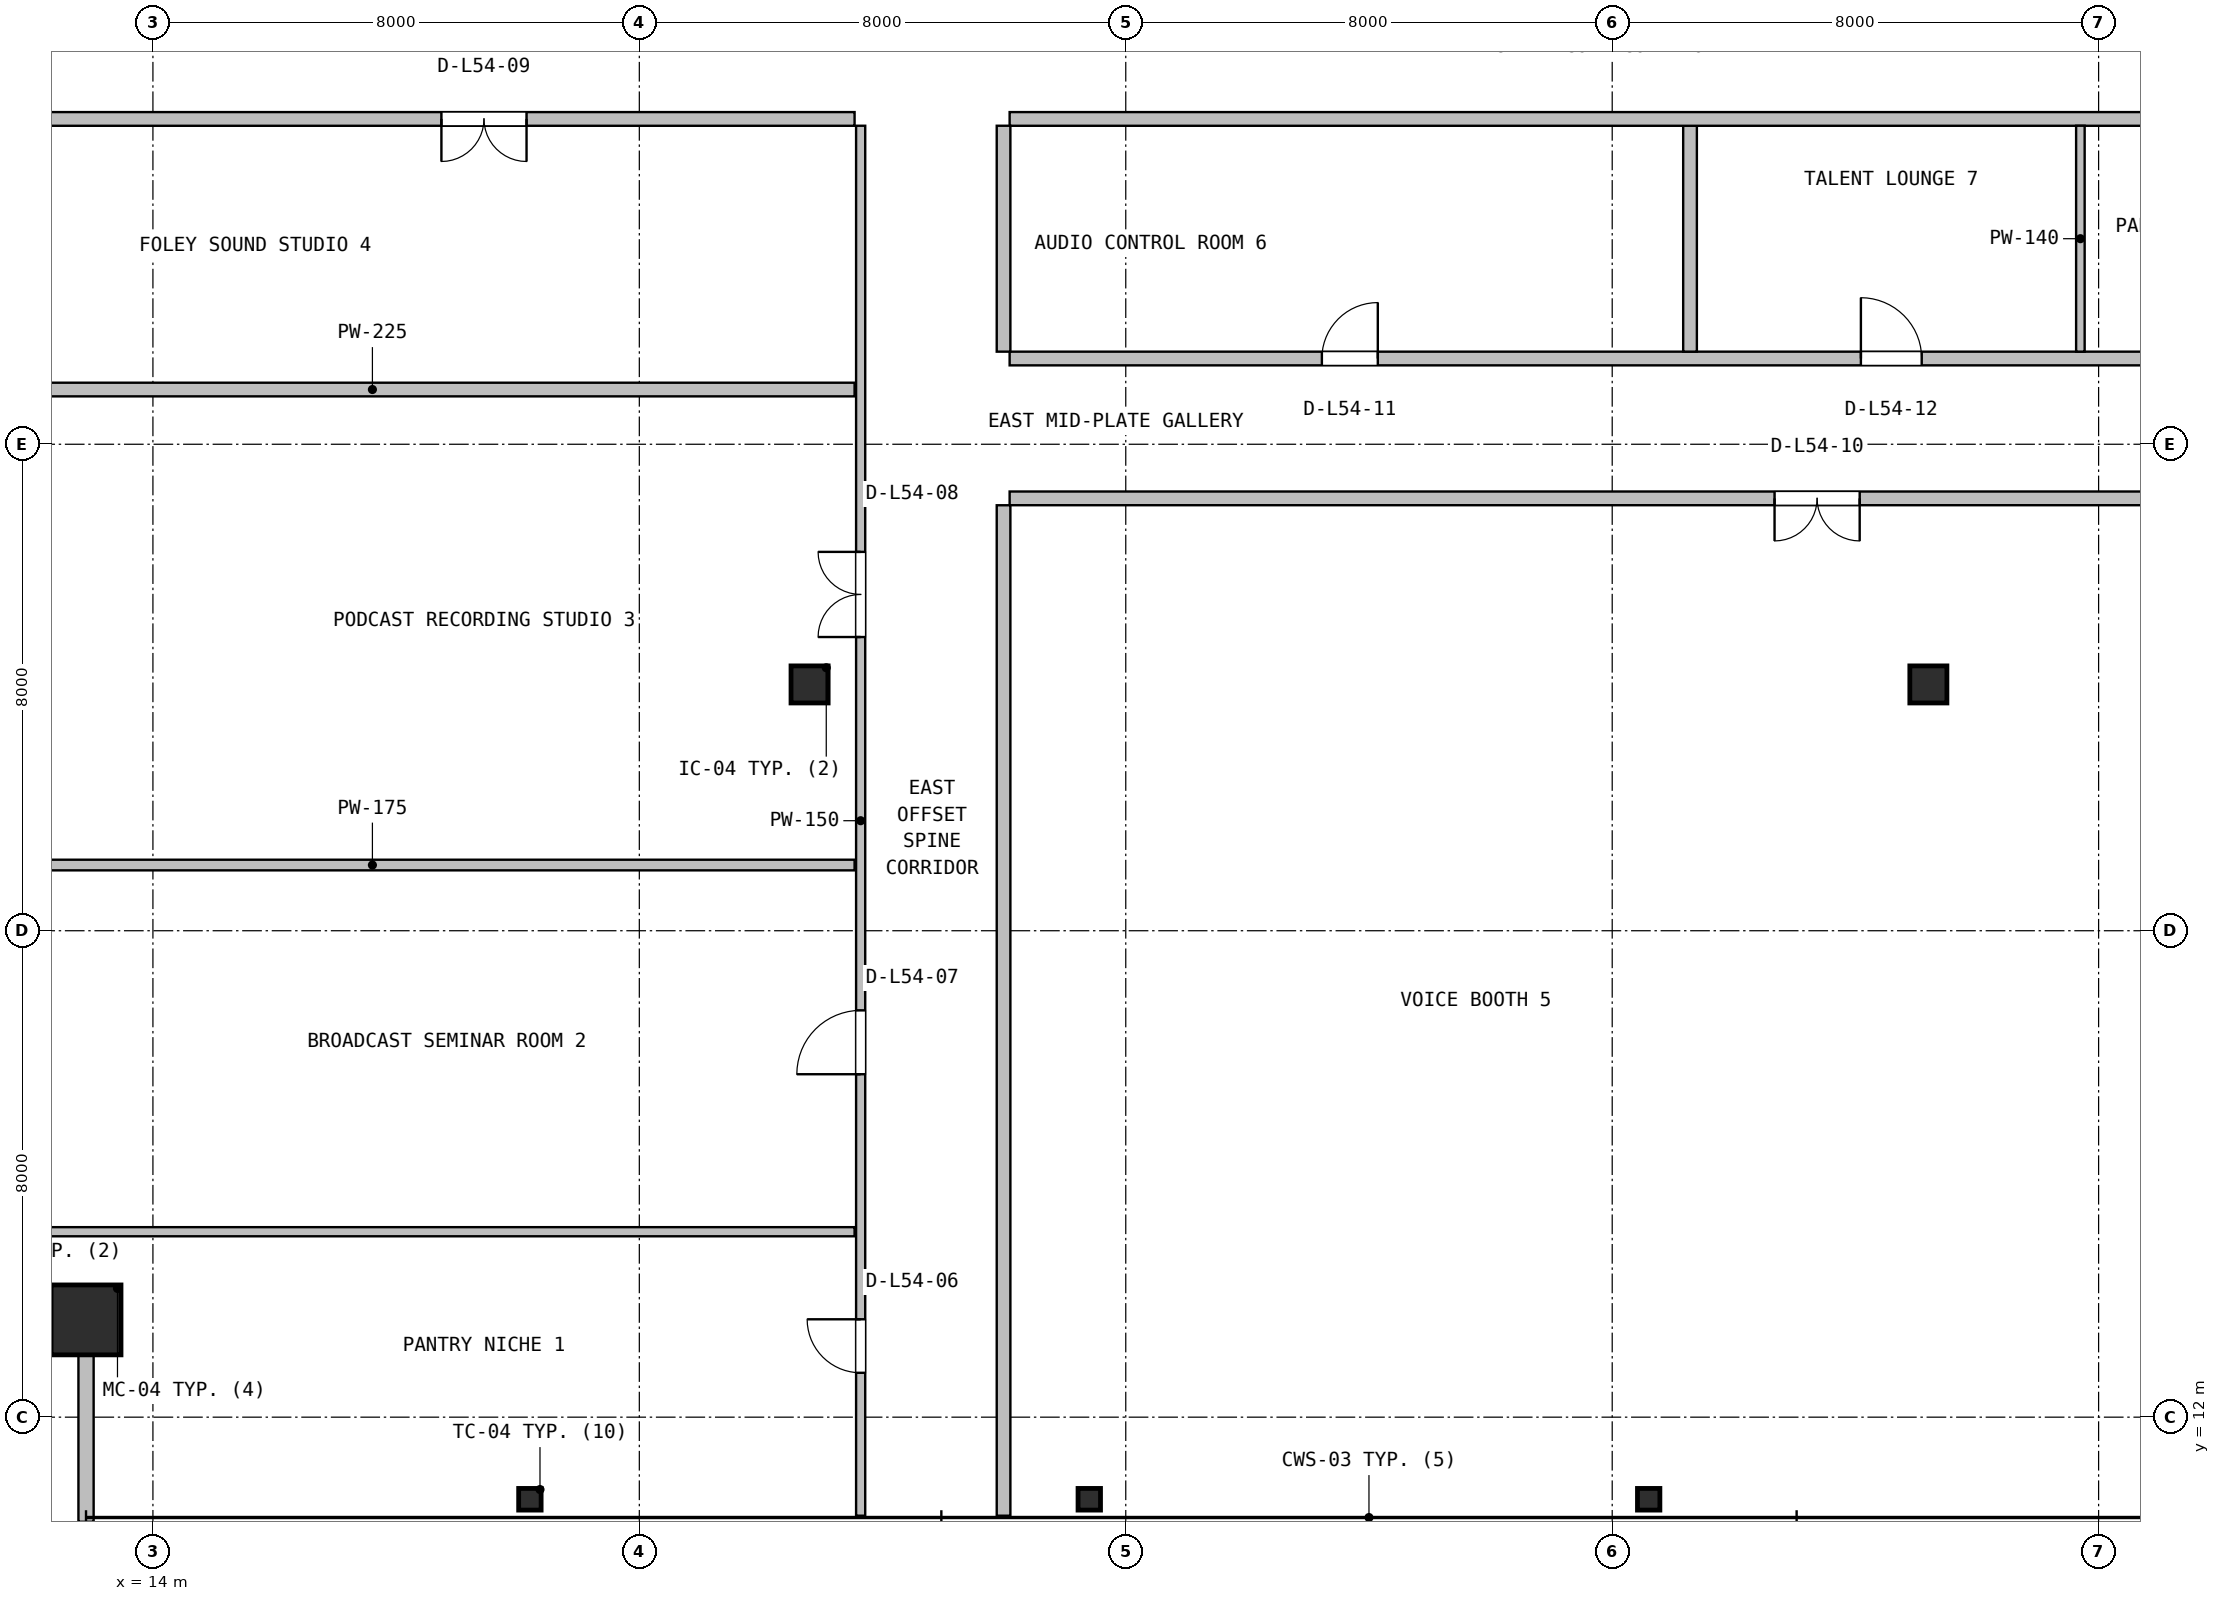
"""IFC4 building model, lengths in metres.
Left out: names, types, materials, properties, quantities, classifications, styles, units other than length and angle.
Written with IfcOpenShell. Run it as: python <this file> out.ifc"""

import sys

from ifc_helpers import new_model, si_unit, direction, frame, frame_2d, origin, origin_2d, place, context, subcontext, project, spatial, rectangle, hollow_rectangle, hollow_circle, i_section, extrude, source, transform, mapped, element, fill, save


model = new_model("IFC4")
c1 = context("Model", 3, precision=1e-05, world=origin(), true_north=direction((0.0, 1.0)))
c2 = subcontext(c1, "Body", "Model", "MODEL_VIEW")
j1 = project(units=[si_unit("LENGTHUNIT", "METRE"), si_unit("PLANEANGLEUNIT", "RADIAN")], contexts=[c1])
p1 = place(None, origin())
s1 = spatial("IfcSite", under=j1, at=p1, CompositionType="ELEMENT")
p2 = place(p1, origin())
s2 = spatial("IfcBuilding", under=s1, at=p2, CompositionType="ELEMENT")
p3 = place(p2, frame((0.0, 0.0, 218.8)))
s3 = spatial("IfcBuildingStorey", under=s2, at=p3, CompositionType="ELEMENT", Elevation=218.8)
m1 = source(origin(), c2, "Body", "SweptSolid", [
    extrude(hollow_rectangle(XDim=1.15, YDim=1.15, WallThickness=0.045, at=origin_2d()), origin(), (0.0, 0.0, 1.0), 3.8),
])
p4 = place(p3, frame((12.9, 13.6, 0.0), z_axis=(0.0, 0.0, 1.0), x_axis=(1.0, 0.0, 0.0)))
e1 = element("IfcColumn", 1, at=p4, inside=s3, PredefinedType="COLUMN", context=c2, shape_type="MappedRepresentation", body=[
    mapped(m1, transform((0.0, 0.0, 0.0), x_axis=(1.0, 0.0, 0.0), y_axis=(0.0, 1.0, 0.0), z_axis=(0.0, 0.0, 1.0), scale=1.0)),
])
m2 = source(origin(), c2, "Body", "SweptSolid", [
    extrude(i_section(OverallWidth=0.369, OverallDepth=0.356, WebThickness=0.011, FlangeThickness=0.018, FilletRadius=0.016, at=origin_2d()), origin(), (0.0, 0.0, 1.0), 3.8),
])
for number, where, z_axis, x_axis in (
    (2, (20.2, 10.65, 0.0), (0.0, 0.0, 1.0), (1.0, 0.0, 0.0)),
    (3, (29.4, 10.65, 0.0), (0.0, 0.0, 1.0), (1.0, 0.0, 0.0)),
    (4, (38.6, 10.65, 0.0), (0.0, 0.0, 1.0), (1.0, 0.0, 0.0)),
):
    element("IfcColumn", number, at=place(p3, frame(where, z_axis=z_axis, x_axis=x_axis)), inside=s3, PredefinedType="COLUMN", context=c2, shape_type="MappedRepresentation", body=[
        mapped(m2, transform((0.0, 0.0, 0.0), x_axis=(1.0, 0.0, 0.0), y_axis=(0.0, 1.0, 0.0), z_axis=(0.0, 0.0, 1.0), scale=1.0)),
    ])
m3 = source(origin(), c2, "Body", "SweptSolid", [
    extrude(hollow_circle(Radius=0.305, WallThickness=0.025, at=origin_2d()), origin(), (0.0, 0.0, 1.0), 3.8),
])
for number, where, z_axis, x_axis in (
    (5, (24.8, 24.05, 0.0), (0.0, 0.0, 1.0), (1.0, 0.0, 0.0)),
    (6, (43.2, 24.05, 0.0), (0.0, 0.0, 1.0), (1.0, 0.0, 0.0)),
):
    element("IfcColumn", number, at=place(p3, frame(where, z_axis=z_axis, x_axis=x_axis)), inside=s3, PredefinedType="COLUMN", context=c2, shape_type="MappedRepresentation", body=[
        mapped(m3, transform((0.0, 0.0, 0.0), x_axis=(1.0, 0.0, 0.0), y_axis=(0.0, 1.0, 0.0), z_axis=(0.0, 0.0, 1.0), scale=1.0)),
    ])
p5 = place(p3, frame((12.9, 10.28, 0.0), z_axis=(0.0, 0.0, 1.0), x_axis=(0.0, 1.0, 0.0)))
e7 = element("IfcWall", 7, at=p5, inside=s3, PredefinedType="SOLIDWALL", context=c2, shape_type="SweptSolid", body=[
    extrude(rectangle(XDim=3.4, YDim=0.25, at=frame_2d((1.7, 0.0))), origin(), (0.0, 0.0, 1.0), 3.171),
])
p6 = place(p3, frame((25.64, 10.38, 0.0), z_axis=(0.0, 0.0, 1.0), x_axis=(0.0, 1.0, 0.0)))
e8 = element("IfcWall", 8, at=p6, inside=s3, PredefinedType="PARTITIONING", context=c2, shape_type="SweptSolid", body=[
    extrude(rectangle(XDim=22.858, YDim=0.15, at=frame_2d((11.429, 0.0))), origin(), (0.0, 0.0, 1.0), 2.908),
])
p7 = place(p6, frame((2.35, 0.0, 0.0)))
e9 = element("IfcOpeningElement", 9, at=p7, cuts=e8, PredefinedType="OPENING", context=c2, shape_type="SweptSolid", body=[
    extrude(rectangle(XDim=0.88, YDim=2.06, at=frame_2d((0.44, 1.03))), frame((0.0, 0.085, 0.0), z_axis=(0.0, -1.0, 0.0), x_axis=(1.0, 0.0, 0.0)), (0.0, 0.0, 1.0), 0.17),
])
p8 = place(p6, frame((7.26, 0.0, 0.0)))
e10 = element("IfcOpeningElement", 10, at=p8, cuts=e8, PredefinedType="OPENING", context=c2, shape_type="SweptSolid", body=[
    extrude(rectangle(XDim=1.05, YDim=2.1, at=frame_2d((0.525, 1.05))), frame((0.0, 0.085, 0.0), z_axis=(0.0, -1.0, 0.0), x_axis=(1.0, 0.0, 0.0)), (0.0, 0.0, 1.0), 0.17),
])
p9 = place(p6, frame((14.45, 0.0, 0.0)))
e11 = element("IfcOpeningElement", 11, at=p9, cuts=e8, PredefinedType="OPENING", context=c2, shape_type="SweptSolid", body=[
    extrude(rectangle(XDim=1.4, YDim=2.12, at=frame_2d((0.7, 1.06))), frame((0.0, 0.085, 0.0), z_axis=(0.0, -1.0, 0.0), x_axis=(1.0, 0.0, 0.0)), (0.0, 0.0, 1.0), 0.17),
])
p10 = place(p3, frame((9.68, 15.05, 0.0), z_axis=(0.0, 0.0, 1.0), x_axis=(1.0, 0.0, 0.0)))
e12 = element("IfcWall", 12, at=p10, inside=s3, PredefinedType="PARTITIONING", context=c2, shape_type="SweptSolid", body=[
    extrude(rectangle(XDim=15.86, YDim=0.15, at=frame_2d((7.93, 0.0))), origin(), (0.0, 0.0, 1.0), 2.908),
])
p11 = place(p3, frame((9.68, 21.08, 0.0), z_axis=(0.0, 0.0, 1.0), x_axis=(1.0, 0.0, 0.0)))
e13 = element("IfcWall", 13, at=p11, inside=s3, PredefinedType="PARTITIONING", context=c2, shape_type="SweptSolid", body=[
    extrude(rectangle(XDim=15.86, YDim=0.175, at=frame_2d((7.93, 0.0))), origin(), (0.0, 0.0, 1.0), 2.908),
])
p12 = place(p3, frame((9.68, 28.9, 0.0), z_axis=(0.0, 0.0, 1.0), x_axis=(1.0, 0.0, 0.0)))
e14 = element("IfcWall", 14, at=p12, inside=s3, PredefinedType="PARTITIONING", context=c2, shape_type="SweptSolid", body=[
    extrude(rectangle(XDim=15.86, YDim=0.225, at=frame_2d((7.93, 0.0))), origin(), (0.0, 0.0, 1.0), 2.908),
])
p13 = place(p3, frame((9.68, 33.35, 0.0), z_axis=(0.0, 0.0, 1.0), x_axis=(1.0, 0.0, 0.0)))
e15 = element("IfcWall", 15, at=p13, inside=s3, PredefinedType="PARTITIONING", context=c2, shape_type="SweptSolid", body=[
    extrude(rectangle(XDim=15.86, YDim=0.225, at=frame_2d((7.93, 0.0))), origin(), (0.0, 0.0, 1.0), 2.908),
])
p14 = place(p13, frame((9.065, 0.0, 0.0)))
e16 = element("IfcOpeningElement", 16, at=p14, cuts=e15, PredefinedType="OPENING", context=c2, shape_type="SweptSolid", body=[
    extrude(rectangle(XDim=1.4, YDim=2.12, at=frame_2d((0.7, 1.06))), frame((0.0, 0.123, 0.0), z_axis=(0.0, -1.0, 0.0), x_axis=(1.0, 0.0, 0.0)), (0.0, 0.0, 1.0), 0.245),
])
p15 = place(p3, frame((28.09, 27.11, 0.0), z_axis=(0.0, 0.0, 1.0), x_axis=(1.0, 0.0, 0.0)))
e17 = element("IfcWall", 17, at=p15, inside=s3, PredefinedType="PARTITIONING", context=c2, shape_type="SweptSolid", body=[
    extrude(rectangle(XDim=30.23, YDim=0.225, at=frame_2d((15.115, 0.0))), origin(), (0.0, 0.0, 1.0), 2.908),
])
p16 = place(p15, frame((12.58, 0.0, 0.0)))
e18 = element("IfcOpeningElement", 18, at=p16, cuts=e17, PredefinedType="OPENING", context=c2, shape_type="SweptSolid", body=[
    extrude(rectangle(XDim=1.4, YDim=2.12, at=frame_2d((0.7, 1.06))), frame((0.0, 0.123, 0.0), z_axis=(0.0, -1.0, 0.0), x_axis=(1.0, 0.0, 0.0)), (0.0, 0.0, 1.0), 0.245),
])
p17 = place(p3, frame((27.99, 10.38, 0.0), z_axis=(0.0, 0.0, 1.0), x_axis=(0.0, 1.0, 0.0)))
e19 = element("IfcWall", 19, at=p17, inside=s3, PredefinedType="PARTITIONING", context=c2, shape_type="SweptSolid", body=[
    extrude(rectangle(XDim=16.617, YDim=0.225, at=frame_2d((8.309, 0.0))), origin(), (0.0, 0.0, 1.0), 2.908),
])
p18 = place(p3, frame((28.09, 29.41, 0.0), z_axis=(0.0, 0.0, 1.0), x_axis=(1.0, 0.0, 0.0)))
e20 = element("IfcWall", 20, at=p18, inside=s3, PredefinedType="PARTITIONING", context=c2, shape_type="SweptSolid", body=[
    extrude(rectangle(XDim=30.23, YDim=0.225, at=frame_2d((15.115, 0.0))), origin(), (0.0, 0.0, 1.0), 2.908),
])
p19 = place(p18, frame((5.135, 0.0, 0.0)))
e21 = element("IfcOpeningElement", 21, at=p19, cuts=e20, PredefinedType="OPENING", context=c2, shape_type="SweptSolid", body=[
    extrude(rectangle(XDim=0.92, YDim=2.08, at=frame_2d((0.46, 1.04))), frame((0.0, 0.123, 0.0), z_axis=(0.0, -1.0, 0.0), x_axis=(1.0, 0.0, 0.0)), (0.0, 0.0, 1.0), 0.245),
])
p20 = place(p18, frame((14.0, 0.0, 0.0)))
e22 = element("IfcOpeningElement", 22, at=p20, cuts=e20, PredefinedType="OPENING", context=c2, shape_type="SweptSolid", body=[
    extrude(rectangle(XDim=1.0, YDim=2.1, at=frame_2d((0.5, 1.05))), frame((0.0, 0.123, 0.0), z_axis=(0.0, -1.0, 0.0), x_axis=(1.0, 0.0, 0.0)), (0.0, 0.0, 1.0), 0.245),
])
p21 = place(p18, frame((21.745, 0.0, 0.0)))
e23 = element("IfcOpeningElement", 23, at=p21, cuts=e20, PredefinedType="OPENING", context=c2, shape_type="SweptSolid", body=[
    extrude(rectangle(XDim=0.88, YDim=2.06, at=frame_2d((0.44, 1.03))), frame((0.0, 0.123, 0.0), z_axis=(0.0, -1.0, 0.0), x_axis=(1.0, 0.0, 0.0)), (0.0, 0.0, 1.0), 0.245),
])
p22 = place(p3, frame((39.28, 29.523, 0.0), z_axis=(0.0, 0.0, 1.0), x_axis=(0.0, 1.0, 0.0)))
e24 = element("IfcWall", 24, at=p22, inside=s3, PredefinedType="PARTITIONING", context=c2, shape_type="SweptSolid", body=[
    extrude(rectangle(XDim=3.715, YDim=0.225, at=frame_2d((1.857, 0.0))), origin(), (0.0, 0.0, 1.0), 3.53),
])
p23 = place(p3, frame((28.09, 33.35, 0.0), z_axis=(0.0, 0.0, 1.0), x_axis=(1.0, 0.0, 0.0)))
e25 = element("IfcWall", 25, at=p23, inside=s3, PredefinedType="PARTITIONING", context=c2, shape_type="SweptSolid", body=[
    extrude(rectangle(XDim=30.23, YDim=0.225, at=frame_2d((15.115, 0.0))), origin(), (0.0, 0.0, 1.0), 2.908),
])
p24 = place(p3, frame((27.99, 29.523, 0.0), z_axis=(0.0, 0.0, 1.0), x_axis=(0.0, 1.0, 0.0)))
e26 = element("IfcWall", 26, at=p24, inside=s3, PredefinedType="PARTITIONING", context=c2, shape_type="SweptSolid", body=[
    extrude(rectangle(XDim=3.715, YDim=0.225, at=frame_2d((1.857, 0.0))), origin(), (0.0, 0.0, 1.0), 3.53),
])
p25 = place(p3, frame((45.7, 29.523, 0.0), z_axis=(0.0, 0.0, 1.0), x_axis=(0.0, 1.0, 0.0)))
e27 = element("IfcWall", 27, at=p25, inside=s3, PredefinedType="PARTITIONING", context=c2, shape_type="SweptSolid", body=[
    extrude(rectangle(XDim=3.715, YDim=0.14, at=frame_2d((1.857, 0.0))), origin(), (0.0, 0.0, 1.0), 3.53),
])
m4 = source(origin(), c2, "Body", "SweptSolid", [
    extrude(rectangle(XDim=0.88, YDim=2.06, at=frame_2d((0.44, 1.03))), frame((0.0, 0.025, 0.0), z_axis=(0.0, -1.0, 0.0), x_axis=(1.0, 0.0, 0.0)), (0.0, 0.0, 1.0), 0.05),
])
p26 = place(p7, origin())
e28 = element("IfcDoor", 28, at=p26, inside=s3, OperationType="SINGLE_SWING_RIGHT", PredefinedType="DOOR", context=c2, shape_type="MappedRepresentation", body=[
    mapped(m4, transform((0.0, 0.0, 0.0), x_axis=(1.0, 0.0, 0.0), y_axis=(0.0, 1.0, 0.0), z_axis=(0.0, 0.0, 1.0), scale=1.0)),
])
fill(e9, e28)
m5 = source(origin(), c2, "Body", "SweptSolid", [
    extrude(rectangle(XDim=1.05, YDim=2.1, at=frame_2d((0.525, 1.05))), frame((0.0, 0.025, 0.0), z_axis=(0.0, -1.0, 0.0), x_axis=(1.0, 0.0, 0.0)), (0.0, 0.0, 1.0), 0.05),
])
p27 = place(p8, origin())
e29 = element("IfcDoor", 29, at=p27, inside=s3, OperationType="SINGLE_SWING_LEFT", PredefinedType="DOOR", context=c2, shape_type="MappedRepresentation", body=[
    mapped(m5, transform((0.0, 0.0, 0.0), x_axis=(1.0, 0.0, 0.0), y_axis=(0.0, 1.0, 0.0), z_axis=(0.0, 0.0, 1.0), scale=1.0)),
])
fill(e10, e29)
m6 = source(origin(), c2, "Body", "SweptSolid", [
    extrude(rectangle(XDim=1.4, YDim=2.12, at=frame_2d((0.7, 1.06))), frame((0.0, 0.025, 0.0), z_axis=(0.0, -1.0, 0.0), x_axis=(1.0, 0.0, 0.0)), (0.0, 0.0, 1.0), 0.05),
])
p28 = place(p9, origin())
e30 = element("IfcDoor", 30, at=p28, inside=s3, OperationType="DOUBLE_DOOR_SINGLE_SWING", PredefinedType="DOOR", context=c2, shape_type="MappedRepresentation", body=[
    mapped(m6, transform((0.0, 0.0, 0.0), x_axis=(1.0, 0.0, 0.0), y_axis=(0.0, 1.0, 0.0), z_axis=(0.0, 0.0, 1.0), scale=1.0)),
])
fill(e11, e30)
p29 = place(p14, frame((1.4, 0.0, 0.0), z_axis=(0.0, 0.0, 1.0), x_axis=(-1.0, 0.0, 0.0)))
e31 = element("IfcDoor", 31, at=p29, inside=s3, OperationType="DOUBLE_DOOR_SINGLE_SWING", PredefinedType="DOOR", context=c2, shape_type="MappedRepresentation", body=[
    mapped(m6, transform((0.0, 0.0, 0.0), x_axis=(1.0, 0.0, 0.0), y_axis=(0.0, 1.0, 0.0), z_axis=(0.0, 0.0, 1.0), scale=1.0)),
])
fill(e16, e31)
p30 = place(p16, frame((1.4, 0.0, 0.0), z_axis=(0.0, 0.0, 1.0), x_axis=(-1.0, 0.0, 0.0)))
e32 = element("IfcDoor", 32, at=p30, inside=s3, OperationType="DOUBLE_DOOR_SINGLE_SWING", PredefinedType="DOOR", context=c2, shape_type="MappedRepresentation", body=[
    mapped(m6, transform((0.0, 0.0, 0.0), x_axis=(1.0, 0.0, 0.0), y_axis=(0.0, 1.0, 0.0), z_axis=(0.0, 0.0, 1.0), scale=1.0)),
])
fill(e18, e32)
m7 = source(origin(), c2, "Body", "SweptSolid", [
    extrude(rectangle(XDim=0.92, YDim=2.08, at=frame_2d((0.46, 1.04))), frame((0.0, 0.025, 0.0), z_axis=(0.0, -1.0, 0.0), x_axis=(1.0, 0.0, 0.0)), (0.0, 0.0, 1.0), 0.05),
])
p31 = place(p19, origin())
e33 = element("IfcDoor", 33, at=p31, inside=s3, OperationType="SINGLE_SWING_RIGHT", PredefinedType="DOOR", context=c2, shape_type="MappedRepresentation", body=[
    mapped(m7, transform((0.0, 0.0, 0.0), x_axis=(1.0, 0.0, 0.0), y_axis=(0.0, 1.0, 0.0), z_axis=(0.0, 0.0, 1.0), scale=1.0)),
])
fill(e21, e33)
m8 = source(origin(), c2, "Body", "SweptSolid", [
    extrude(rectangle(XDim=1.0, YDim=2.1, at=frame_2d((0.5, 1.05))), frame((0.0, 0.025, 0.0), z_axis=(0.0, -1.0, 0.0), x_axis=(1.0, 0.0, 0.0)), (0.0, 0.0, 1.0), 0.05),
])
p32 = place(p20, origin())
e34 = element("IfcDoor", 34, at=p32, inside=s3, OperationType="SINGLE_SWING_LEFT", PredefinedType="DOOR", context=c2, shape_type="MappedRepresentation", body=[
    mapped(m8, transform((0.0, 0.0, 0.0), x_axis=(1.0, 0.0, 0.0), y_axis=(0.0, 1.0, 0.0), z_axis=(0.0, 0.0, 1.0), scale=1.0)),
])
fill(e22, e34)
save(model, sys.argv[1])
